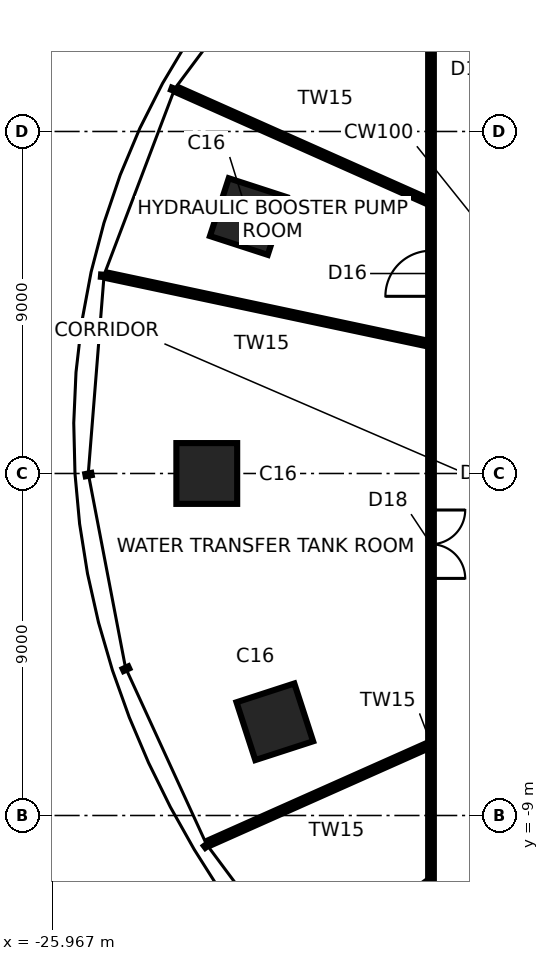
"""IFC4 building model, lengths in metres.
Left out: names, types, materials, properties, quantities, classifications, styles, units other than length and angle.
Written with IfcOpenShell. Run it as: python <this file> out.ifc"""

import sys

from ifc_helpers import new_model, si_unit, direction, frame, frame_2d, origin, origin_2d, place, context, subcontext, project, spatial, rectangle, extrude, element, fill, save


model = new_model("IFC4")
c1 = context("Model", 3, precision=1e-05, world=origin(), true_north=direction((0.0, 1.0)))
c2 = subcontext(c1, "Body", "Model", "MODEL_VIEW")
j1 = project(units=[si_unit("LENGTHUNIT", "METRE"), si_unit("PLANEANGLEUNIT", "RADIAN")], contexts=[c1])
p1 = place(None, origin())
s1 = spatial("IfcSite", under=j1, at=p1, CompositionType="ELEMENT")
p2 = place(p1, origin())
s2 = spatial("IfcBuilding", under=s1, at=p2, CompositionType="ELEMENT")
p3 = place(p2, frame((0.0, 0.0, 166.5)))
s3 = spatial("IfcBuildingStorey", under=s2, at=p3, CompositionType="ELEMENT", Elevation=166.5)
for number, where, z_axis, x_axis in (
    (1, (-20.808, 6.761, 0.0), (0.0, 0.0, 1.0), (-0.951, 0.309, 0.0)),
    (2, (-21.9, 0.0, 0.0), (0.0, 0.0, 1.0), (-1.0, 0.0, 0.0)),
    (3, (-20.109, -6.534, 0.0), (0.0, 0.0, 1.0), (-0.951, -0.309, 0.0)),
):
    element("IfcColumn", number, at=place(p3, frame(where, z_axis=z_axis, x_axis=x_axis)), inside=s3, PredefinedType="COLUMN", context=c2, shape_type="SweptSolid", body=[
        extrude(rectangle(XDim=1.6, YDim=1.6, at=origin_2d()), origin(), (0.0, 0.0, 1.0), 5.6),
    ])
p4 = place(p3, frame((-16.0, -7.124, 0.0), z_axis=(0.0, 0.0, 1.0), x_axis=(-0.913548180065, -0.406730528359, 0.0)))
e4 = element("IfcWall", 4, at=p4, inside=s3, PredefinedType="PARTITIONING", context=c2, shape_type="SweptSolid", body=[
    extrude(rectangle(XDim=6.388, YDim=0.15, at=frame_2d((3.194, 0.0))), origin(), (0.0, 0.0, 1.0), 5.4),
])
p5 = place(p3, frame((-16.0, 7.124, 0.0), z_axis=(0.0, 0.0, 1.0), x_axis=(-0.913547973194, 0.406730993007, 0.0)))
e5 = element("IfcWall", 5, at=p5, inside=s3, PredefinedType="PARTITIONING", context=c2, shape_type="SweptSolid", body=[
    extrude(rectangle(XDim=7.301, YDim=0.15, at=frame_2d((3.65, 0.0))), origin(), (0.0, 0.0, 1.0), 5.4),
])
p6 = place(p3, frame((-16.0, 3.401, 0.0), z_axis=(0.0, 0.0, 1.0), x_axis=(-0.978149592602, 0.207902319596, 0.0)))
e6 = element("IfcWall", 6, at=p6, inside=s3, PredefinedType="PARTITIONING", context=c2, shape_type="SweptSolid", body=[
    extrude(rectangle(XDim=8.713, YDim=0.15, at=frame_2d((4.357, 0.0))), origin(), (0.0, 0.0, 1.0), 5.4),
])
p7 = place(p3, frame((-16.0, 11.3, 0.0), z_axis=(0.0, 0.0, 1.0), x_axis=(0.0, -1.0, 0.0)))
e7 = element("IfcWall", 7, at=p7, inside=s3, PredefinedType="PARTITIONING", context=c2, shape_type="SweptSolid", body=[
    extrude(rectangle(XDim=22.6, YDim=0.15, at=frame_2d((11.3, 0.0))), origin(), (0.0, 0.0, 1.0), 5.4),
])
p8 = place(p7, frame((5.438, 0.0, 0.0)))
e8 = element("IfcOpeningElement", 8, at=p8, cuts=e7, PredefinedType="OPENING", context=c2, shape_type="SweptSolid", body=[
    extrude(rectangle(XDim=1.2, YDim=2.1, at=frame_2d((0.6, 1.05))), frame((0.0, 0.085, 0.0), z_axis=(0.0, -1.0, 0.0), x_axis=(1.0, 0.0, 0.0)), (0.0, 0.0, 1.0), 0.17),
])
p9 = place(p7, frame((12.261, 0.0, 0.0)))
e9 = element("IfcOpeningElement", 9, at=p9, cuts=e7, PredefinedType="OPENING", context=c2, shape_type="SweptSolid", body=[
    extrude(rectangle(XDim=1.8, YDim=2.4, at=frame_2d((0.9, 1.2))), frame((0.0, 0.085, 0.0), z_axis=(0.0, -1.0, 0.0), x_axis=(1.0, 0.0, 0.0)), (0.0, 0.0, 1.0), 0.17),
])
p10 = place(p8, frame((1.2, 0.0, 0.0), z_axis=(0.0, 0.0, 1.0), x_axis=(-1.0, 0.0, 0.0)))
e10 = element("IfcDoor", 10, at=p10, inside=s3, OperationType="SINGLE_SWING_LEFT", PredefinedType="DOOR", context=c2, shape_type="SweptSolid", body=[
    extrude(rectangle(XDim=1.2, YDim=2.1, at=frame_2d((0.6, 1.05))), frame((0.0, 0.025, 0.0), z_axis=(0.0, -1.0, 0.0), x_axis=(1.0, 0.0, 0.0)), (0.0, 0.0, 1.0), 0.05),
])
fill(e8, e10)
p11 = place(p9, origin())
e11 = element("IfcDoor", 11, at=p11, inside=s3, OperationType="DOUBLE_DOOR_SINGLE_SWING", PredefinedType="DOOR", context=c2, shape_type="SweptSolid", body=[
    extrude(rectangle(XDim=1.8, YDim=2.4, at=frame_2d((0.9, 1.2))), frame((0.0, 0.025, 0.0), z_axis=(0.0, -1.0, 0.0), x_axis=(1.0, 0.0, 0.0)), (0.0, 0.0, 1.0), 0.05),
])
fill(e9, e11)
save(model, sys.argv[1])
